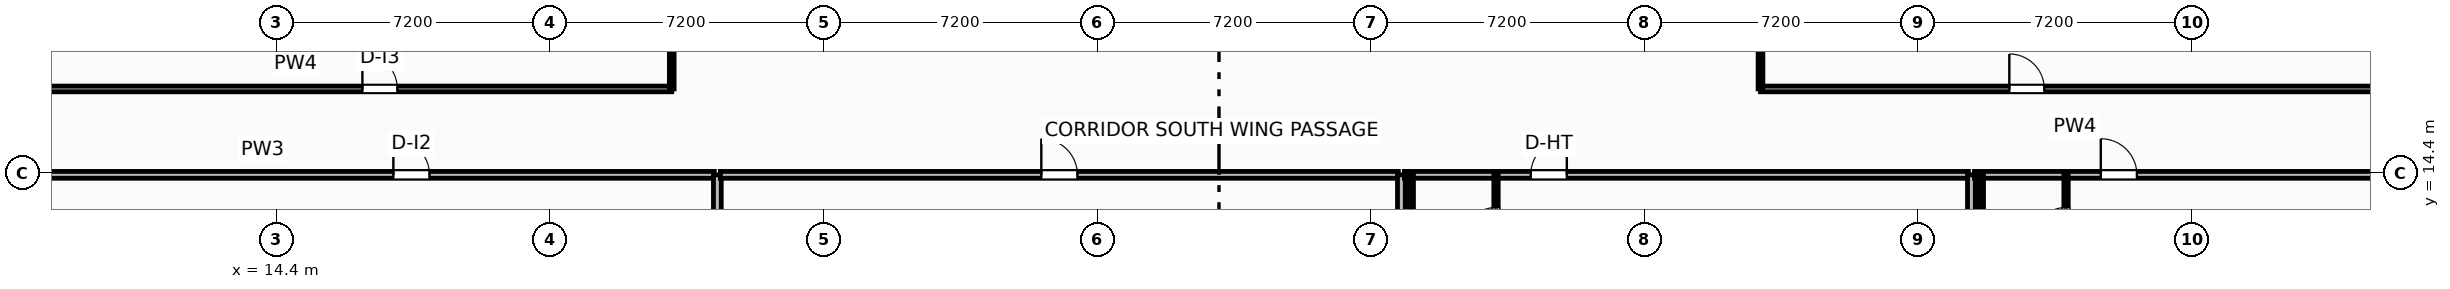
"""IFC4 building model, lengths in metres.
Left out: names, types, materials, properties, quantities, classifications, styles, units other than length and angle.
Written with IfcOpenShell. Run it as: python <this file> out.ifc"""

import sys

from ifc_helpers import new_model, si_unit, direction, frame, frame_2d, origin, place, context, subcontext, project, spatial, rectangle, extrude, element, fill, save


model = new_model("IFC4")
c1 = context("Model", 3, precision=1e-05, world=origin(), true_north=direction((0.0, 1.0)))
c2 = subcontext(c1, "Body", "Model", "MODEL_VIEW")
j1 = project(units=[si_unit("LENGTHUNIT", "METRE"), si_unit("PLANEANGLEUNIT", "RADIAN")], contexts=[c1])
p1 = place(None, origin())
s1 = spatial("IfcSite", under=j1, at=p1, CompositionType="ELEMENT")
p2 = place(p1, origin())
s2 = spatial("IfcBuilding", under=s1, at=p2, CompositionType="ELEMENT")
p3 = place(p2, frame((0.0, 0.0, 87.3)))
s3 = spatial("IfcBuildingStorey", under=s2, at=p3, CompositionType="ELEMENT", Elevation=87.3)
p4 = place(p3, frame((1.026, 14.753, 0.0), z_axis=(0.0, 0.0, 1.0), x_axis=(0.935222448475, -0.354060689526, 0.0)))
e1 = element("IfcWall", 1, at=p4, inside=s3, PredefinedType="SOLIDWALL", context=c2, shape_type="SweptSolid", body=[
    extrude(rectangle(XDim=14.447, YDim=0.22, at=frame_2d((7.224, 0.0))), origin(), (0.0, 0.0, 1.0), 2.73),
])
p5 = place(p4, frame((6.399, 0.0, 0.8)))
e2 = element("IfcOpeningElement", 2, at=p5, cuts=e1, PredefinedType="OPENING", context=c2, shape_type="SweptSolid", body=[
    extrude(rectangle(XDim=1.65, YDim=1.65, at=frame_2d((0.825, 0.825))), frame((0.0, 0.12, 0.0), z_axis=(0.0, -1.0, 0.0), x_axis=(1.0, 0.0, 0.0)), (0.0, 0.0, 1.0), 0.24),
])
p6 = place(p3, frame((5.0, 16.61, 0.0), z_axis=(0.0, 0.0, 1.0), x_axis=(1.0, 0.0, 0.0)))
e3 = element("IfcWall", 3, at=p6, inside=s3, PredefinedType="PARTITIONING", context=c2, shape_type="SweptSolid", body=[
    extrude(rectangle(XDim=19.8, YDim=0.15, at=frame_2d((9.9, 0.0))), origin(), (0.0, 0.0, 1.0), 3.45),
])
p7 = place(p6, frame((11.66, 0.0, 0.0)))
e4 = element("IfcOpeningElement", 4, at=p7, cuts=e3, PredefinedType="OPENING", context=c2, shape_type="SweptSolid", body=[
    extrude(rectangle(XDim=0.92, YDim=2.05, at=frame_2d((0.46, 1.025))), frame((0.0, 0.085, 0.0), z_axis=(0.0, -1.0, 0.0), x_axis=(1.0, 0.0, 0.0)), (0.0, 0.0, 1.0), 0.17),
])
p8 = place(p3, frame((24.8, 16.61, 0.0), z_axis=(0.0, 0.0, 1.0), x_axis=(0.0, 1.0, 0.0)))
e5 = element("IfcWall", 5, at=p8, inside=s3, PredefinedType="PARTITIONING", context=c2, shape_type="SweptSolid", body=[
    extrude(rectangle(XDim=2.63, YDim=0.125, at=frame_2d((1.315, 0.0))), origin(), (0.0, 0.0, 1.0), 3.45),
])
p9 = place(p3, frame((53.45, 16.61, 0.0), z_axis=(0.0, 0.0, 1.0), x_axis=(1.0, 0.0, 0.0)))
e6 = element("IfcWall", 6, at=p9, inside=s3, PredefinedType="PARTITIONING", context=c2, shape_type="SweptSolid", body=[
    extrude(rectangle(XDim=16.55, YDim=0.15, at=frame_2d((8.275, 0.0))), origin(), (0.0, 0.0, 1.0), 2.58),
])
p10 = place(p9, frame((6.548, 0.0, 0.0)))
e7 = element("IfcOpeningElement", 7, at=p10, cuts=e6, PredefinedType="OPENING", context=c2, shape_type="SweptSolid", body=[
    extrude(rectangle(XDim=0.92, YDim=2.05, at=frame_2d((0.46, 1.025))), frame((0.0, 0.085, 0.0), z_axis=(0.0, -1.0, 0.0), x_axis=(1.0, 0.0, 0.0)), (0.0, 0.0, 1.0), 0.17),
])
p11 = place(p3, frame((53.45, 16.61, 0.0), z_axis=(0.0, 0.0, 1.0), x_axis=(0.0, 1.0, 0.0)))
e8 = element("IfcWall", 8, at=p11, inside=s3, PredefinedType="PARTITIONING", context=c2, shape_type="SweptSolid", body=[
    extrude(rectangle(XDim=2.63, YDim=0.125, at=frame_2d((1.315, 0.0))), origin(), (0.0, 0.0, 1.0), 2.58),
])
p12 = place(p3, frame((2.146, 14.35, 0.0), z_axis=(0.0, 0.0, 1.0), x_axis=(1.0, 0.0, 0.0)))
e9 = element("IfcWall", 9, at=p12, inside=s3, PredefinedType="PARTITIONING", context=c2, shape_type="SweptSolid", body=[
    extrude(rectangle(XDim=23.774, YDim=0.18, at=frame_2d((11.887, 0.0))), origin(), (0.0, 0.0, 1.0), 3.45),
])
p13 = place(p12, frame((15.329, 0.0, 0.0)))
e10 = element("IfcOpeningElement", 10, at=p13, cuts=e9, PredefinedType="OPENING", context=c2, shape_type="SweptSolid", body=[
    extrude(rectangle(XDim=0.95, YDim=2.05, at=frame_2d((0.475, 1.025))), frame((0.0, 0.1, 0.0), z_axis=(0.0, -1.0, 0.0), x_axis=(1.0, 0.0, 0.0)), (0.0, 0.0, 1.0), 0.2),
])
p14 = place(p3, frame((26.0, 5.319, 0.0), z_axis=(0.0, 0.0, 1.0), x_axis=(0.0, 1.0, 0.0)))
e11 = element("IfcWall", 11, at=p14, inside=s3, PredefinedType="PARTITIONING", context=c2, shape_type="SweptSolid", body=[
    extrude(rectangle(XDim=9.031, YDim=0.205, at=frame_2d((4.515, 0.0))), origin(), (0.0, 0.0, 1.0), 3.45),
])
p15 = place(p3, frame((26.08, 14.35, 0.0), z_axis=(0.0, 0.0, 1.0), x_axis=(1.0, 0.0, 0.0)))
e12 = element("IfcWall", 12, at=p15, inside=s3, PredefinedType="PARTITIONING", context=c2, shape_type="SweptSolid", body=[
    extrude(rectangle(XDim=17.84, YDim=0.18, at=frame_2d((8.92, 0.0))), origin(), (0.0, 0.0, 1.0), 3.45),
])
p16 = place(p15, frame((8.445, 0.0, 0.0)))
e13 = element("IfcOpeningElement", 13, at=p16, cuts=e12, PredefinedType="OPENING", context=c2, shape_type="SweptSolid", body=[
    extrude(rectangle(XDim=0.95, YDim=2.05, at=frame_2d((0.475, 1.025))), frame((0.0, 0.1, 0.0), z_axis=(0.0, -1.0, 0.0), x_axis=(1.0, 0.0, 0.0)), (0.0, 0.0, 1.0), 0.2),
])
p17 = place(p3, frame((44.0, 0.75, 0.0), z_axis=(0.0, 0.0, 1.0), x_axis=(0.0, 1.0, 0.0)))
e14 = element("IfcWall", 14, at=p17, inside=s3, PredefinedType="PARTITIONING", context=c2, shape_type="SweptSolid", body=[
    extrude(rectangle(XDim=13.6, YDim=0.205, at=frame_2d((6.8, 0.0))), origin(), (0.0, 0.0, 1.0), 3.45),
])
p18 = place(p3, frame((44.08, 14.35, 0.0), z_axis=(0.0, 0.0, 1.0), x_axis=(1.0, 0.0, 0.0)))
e15 = element("IfcWall", 15, at=p18, inside=s3, PredefinedType="PARTITIONING", context=c2, shape_type="SweptSolid", body=[
    extrude(rectangle(XDim=14.84, YDim=0.18, at=frame_2d((7.42, 0.0))), origin(), (0.0, 0.0, 1.0), 3.45),
])
p19 = place(p18, frame((3.323, 0.0, 0.0)))
e16 = element("IfcOpeningElement", 16, at=p19, cuts=e15, PredefinedType="OPENING", context=c2, shape_type="SweptSolid", body=[
    extrude(rectangle(XDim=0.95, YDim=2.15, at=frame_2d((0.475, 1.075))), frame((0.0, 0.1, 0.0), z_axis=(0.0, -1.0, 0.0), x_axis=(1.0, 0.0, 0.0)), (0.0, 0.0, 1.0), 0.2),
])
p20 = place(p3, frame((46.49, 11.83, 0.0), z_axis=(0.0, 0.0, 1.0), x_axis=(0.0, 1.0, 0.0)))
e17 = element("IfcWall", 17, at=p20, inside=s3, PredefinedType="PARTITIONING", context=c2, shape_type="SweptSolid", body=[
    extrude(rectangle(XDim=2.52, YDim=0.115, at=frame_2d((1.26, 0.0))), origin(), (0.0, 0.0, 1.0), 3.45),
])
p21 = place(p20, frame((0.76, 0.0, 0.0)))
e18 = element("IfcOpeningElement", 18, at=p21, cuts=e17, PredefinedType="OPENING", context=c2, shape_type="SweptSolid", body=[
    extrude(rectangle(XDim=0.9, YDim=2.05, at=frame_2d((0.45, 1.025))), frame((0.0, 0.067, 0.0), z_axis=(0.0, -1.0, 0.0), x_axis=(1.0, 0.0, 0.0)), (0.0, 0.0, 1.0), 0.135),
])
p22 = place(p3, frame((44.26, 11.83, 0.0), z_axis=(0.0, 0.0, 1.0), x_axis=(0.0, 1.0, 0.0)))
e19 = element("IfcWall", 19, at=p22, inside=s3, PredefinedType="PARTITIONING", context=c2, shape_type="SweptSolid", body=[
    extrude(rectangle(XDim=2.52, YDim=0.115, at=frame_2d((1.26, 0.0))), origin(), (0.0, 0.0, 1.0), 3.45),
])
p23 = place(p3, frame((59.0, -4.0, 0.0), z_axis=(0.0, 0.0, 1.0), x_axis=(0.0, 1.0, 0.0)))
e20 = element("IfcWall", 20, at=p23, inside=s3, PredefinedType="PARTITIONING", context=c2, shape_type="SweptSolid", body=[
    extrude(rectangle(XDim=18.35, YDim=0.205, at=frame_2d((9.175, 0.0))), origin(), (0.0, 0.0, 1.0), 3.45),
])
p24 = place(p3, frame((59.08, 14.35, 0.0), z_axis=(0.0, 0.0, 1.0), x_axis=(1.0, 0.0, 0.0)))
e21 = element("IfcWall", 21, at=p24, inside=s3, PredefinedType="PARTITIONING", context=c2, shape_type="SweptSolid", body=[
    extrude(rectangle(XDim=15.775, YDim=0.18, at=frame_2d((7.888, 0.0))), origin(), (0.0, 0.0, 1.0), 2.58),
])
p25 = place(p24, frame((3.324, 0.0, 0.0)))
e22 = element("IfcOpeningElement", 22, at=p25, cuts=e21, PredefinedType="OPENING", context=c2, shape_type="SweptSolid", body=[
    extrude(rectangle(XDim=0.95, YDim=2.15, at=frame_2d((0.475, 1.075))), frame((0.0, 0.1, 0.0), z_axis=(0.0, -1.0, 0.0), x_axis=(1.0, 0.0, 0.0)), (0.0, 0.0, 1.0), 0.2),
])
p26 = place(p3, frame((61.49, 11.83, 0.0), z_axis=(0.0, 0.0, 1.0), x_axis=(0.0, 1.0, 0.0)))
e23 = element("IfcWall", 23, at=p26, inside=s3, PredefinedType="PARTITIONING", context=c2, shape_type="SweptSolid", body=[
    extrude(rectangle(XDim=2.52, YDim=0.115, at=frame_2d((1.26, 0.0))), origin(), (0.0, 0.0, 1.0), 3.45),
])
p27 = place(p26, frame((0.76, 0.0, 0.0)))
e24 = element("IfcOpeningElement", 24, at=p27, cuts=e23, PredefinedType="OPENING", context=c2, shape_type="SweptSolid", body=[
    extrude(rectangle(XDim=0.9, YDim=2.05, at=frame_2d((0.45, 1.025))), frame((0.0, 0.067, 0.0), z_axis=(0.0, -1.0, 0.0), x_axis=(1.0, 0.0, 0.0)), (0.0, 0.0, 1.0), 0.135),
])
p28 = place(p3, frame((59.26, 11.83, 0.0), z_axis=(0.0, 0.0, 1.0), x_axis=(0.0, 1.0, 0.0)))
e25 = element("IfcWall", 25, at=p28, inside=s3, PredefinedType="PARTITIONING", context=c2, shape_type="SweptSolid", body=[
    extrude(rectangle(XDim=2.52, YDim=0.115, at=frame_2d((1.26, 0.0))), origin(), (0.0, 0.0, 1.0), 3.45),
])
p29 = place(p7, origin())
e26 = element("IfcDoor", 26, at=p29, inside=s3, OperationType="SINGLE_SWING_LEFT", PredefinedType="DOOR", context=c2, shape_type="SweptSolid", body=[
    extrude(rectangle(XDim=0.92, YDim=2.05, at=frame_2d((0.46, 1.025))), frame((0.0, 0.025, 0.0), z_axis=(0.0, -1.0, 0.0), x_axis=(1.0, 0.0, 0.0)), (0.0, 0.0, 1.0), 0.05),
])
fill(e4, e26)
p30 = place(p10, origin())
e27 = element("IfcDoor", 27, at=p30, inside=s3, OperationType="SINGLE_SWING_LEFT", PredefinedType="DOOR", context=c2, shape_type="SweptSolid", body=[
    extrude(rectangle(XDim=0.92, YDim=2.05, at=frame_2d((0.46, 1.025))), frame((0.0, 0.025, 0.0), z_axis=(0.0, -1.0, 0.0), x_axis=(1.0, 0.0, 0.0)), (0.0, 0.0, 1.0), 0.05),
])
fill(e7, e27)
p31 = place(p13, origin())
e28 = element("IfcDoor", 28, at=p31, inside=s3, OperationType="SINGLE_SWING_LEFT", PredefinedType="DOOR", context=c2, shape_type="SweptSolid", body=[
    extrude(rectangle(XDim=0.95, YDim=2.05, at=frame_2d((0.475, 1.025))), frame((0.0, 0.025, 0.0), z_axis=(0.0, -1.0, 0.0), x_axis=(1.0, 0.0, 0.0)), (0.0, 0.0, 1.0), 0.05),
])
fill(e10, e28)
p32 = place(p16, origin())
e29 = element("IfcDoor", 29, at=p32, inside=s3, OperationType="SINGLE_SWING_LEFT", PredefinedType="DOOR", context=c2, shape_type="SweptSolid", body=[
    extrude(rectangle(XDim=0.95, YDim=2.05, at=frame_2d((0.475, 1.025))), frame((0.0, 0.025, 0.0), z_axis=(0.0, -1.0, 0.0), x_axis=(1.0, 0.0, 0.0)), (0.0, 0.0, 1.0), 0.05),
])
fill(e13, e29)
p33 = place(p19, origin())
e30 = element("IfcDoor", 30, at=p33, inside=s3, OperationType="SINGLE_SWING_RIGHT", PredefinedType="DOOR", context=c2, shape_type="SweptSolid", body=[
    extrude(rectangle(XDim=0.95, YDim=2.15, at=frame_2d((0.475, 1.075))), frame((0.0, 0.025, 0.0), z_axis=(0.0, -1.0, 0.0), x_axis=(1.0, 0.0, 0.0)), (0.0, 0.0, 1.0), 0.05),
])
fill(e16, e30)
p34 = place(p21, origin())
e31 = element("IfcDoor", 31, at=p34, inside=s3, OperationType="SINGLE_SWING_LEFT", PredefinedType="DOOR", context=c2, shape_type="SweptSolid", body=[
    extrude(rectangle(XDim=0.9, YDim=2.05, at=frame_2d((0.45, 1.025))), frame((0.0, 0.025, 0.0), z_axis=(0.0, -1.0, 0.0), x_axis=(1.0, 0.0, 0.0)), (0.0, 0.0, 1.0), 0.05),
])
fill(e18, e31)
p35 = place(p25, origin())
e32 = element("IfcDoor", 32, at=p35, inside=s3, OperationType="SINGLE_SWING_LEFT", PredefinedType="DOOR", context=c2, shape_type="SweptSolid", body=[
    extrude(rectangle(XDim=0.95, YDim=2.15, at=frame_2d((0.475, 1.075))), frame((0.0, 0.025, 0.0), z_axis=(0.0, -1.0, 0.0), x_axis=(1.0, 0.0, 0.0)), (0.0, 0.0, 1.0), 0.05),
])
fill(e22, e32)
p36 = place(p27, origin())
e33 = element("IfcDoor", 33, at=p36, inside=s3, OperationType="SINGLE_SWING_LEFT", PredefinedType="DOOR", context=c2, shape_type="SweptSolid", body=[
    extrude(rectangle(XDim=0.9, YDim=2.05, at=frame_2d((0.45, 1.025))), frame((0.0, 0.025, 0.0), z_axis=(0.0, -1.0, 0.0), x_axis=(1.0, 0.0, 0.0)), (0.0, 0.0, 1.0), 0.05),
])
fill(e24, e33)
save(model, sys.argv[1])
